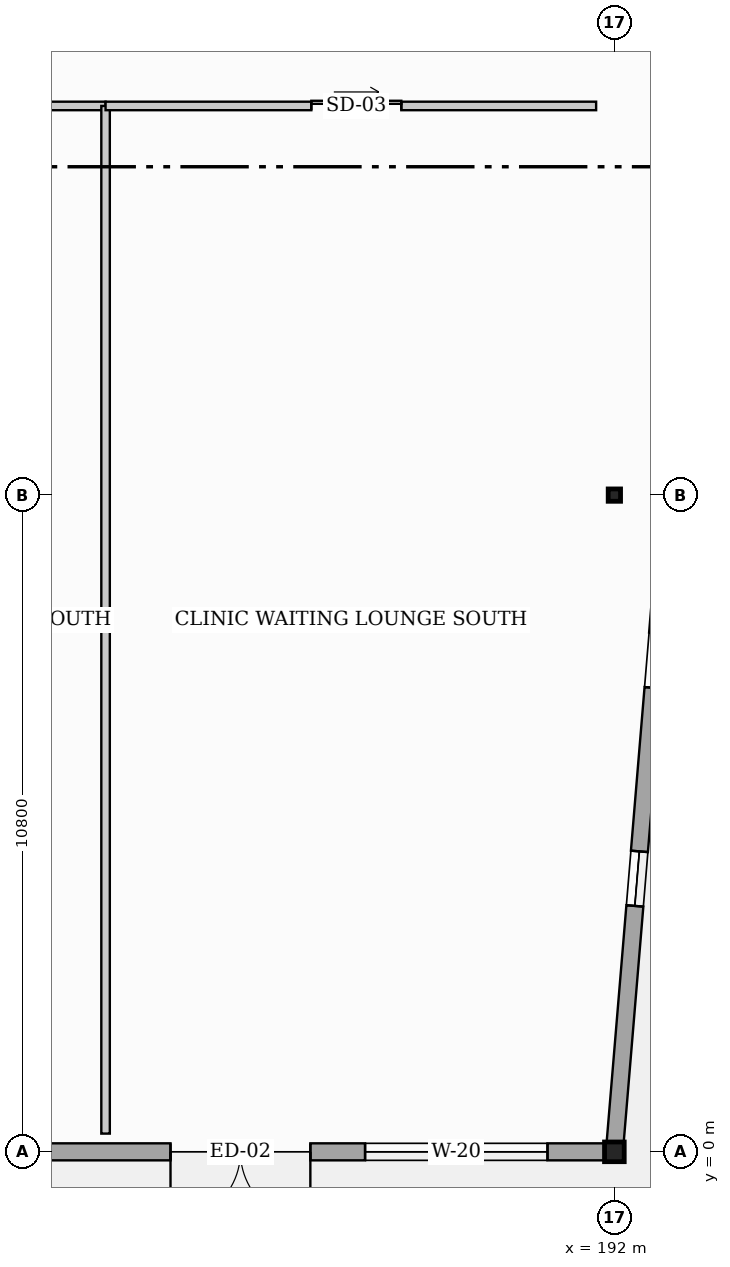
"""IFC4 building model, lengths in metres.
Left out: names, types, materials, properties, quantities, classifications, styles, units other than length and angle.
Written with IfcOpenShell. Run it as: python <this file> out.ifc"""

import sys

from ifc_helpers import new_model, si_unit, direction, frame, frame_2d, origin, origin_2d, place, context, subcontext, project, spatial, rectangle, hollow_circle, i_section, extrude, element, fill, save


model = new_model("IFC4")
c1 = context("Model", 3, precision=1e-05, world=origin(), true_north=direction((0.0, 1.0)))
c2 = subcontext(c1, "Body", "Model", "MODEL_VIEW")
j1 = project(units=[si_unit("LENGTHUNIT", "METRE"), si_unit("PLANEANGLEUNIT", "RADIAN")], contexts=[c1])
p1 = place(None, origin())
s1 = spatial("IfcSite", under=j1, at=p1, CompositionType="ELEMENT")
p2 = place(p1, origin())
s2 = spatial("IfcBuilding", under=s1, at=p2, CompositionType="ELEMENT")
p3 = place(p2, origin())
s3 = spatial("IfcBuildingStorey", under=s2, at=p3, CompositionType="ELEMENT", Elevation=0.0)
p4 = place(p3, frame((192.0, 0.0, 0.0), z_axis=(0.0, 0.0, 1.0), x_axis=(1.0, 0.0, 0.0)))
e1 = element("IfcColumn", 1, at=p4, inside=s3, PredefinedType="COLUMN", context=c2, shape_type="SweptSolid", body=[
    extrude(hollow_circle(Radius=0.162, WallThickness=0.013, at=origin_2d()), origin(), (0.0, 0.0, 1.0), 4.8),
])
p5 = place(p3, frame((192.0, 10.8, 0.0), z_axis=(0.0, 0.0, 1.0), x_axis=(1.0, 0.0, 0.0)))
e2 = element("IfcColumn", 2, at=p5, inside=s3, PredefinedType="COLUMN", context=c2, shape_type="SweptSolid", body=[
    extrude(i_section(OverallWidth=0.203, OverallDepth=0.203, WebThickness=0.007, FlangeThickness=0.011, at=origin_2d()), origin(), (0.0, 0.0, 1.0), 4.8),
])
p6 = place(p3, frame((192.0, 0.0, 0.0), z_axis=(0.0, 0.0, 1.0), x_axis=(-1.0, 0.0, 0.0)))
e3 = element("IfcWall", 3, at=p6, inside=s3, PredefinedType="STANDARD", context=c2, shape_type="SweptSolid", body=[
    extrude(rectangle(XDim=24.0, YDim=0.28, at=frame_2d((12.0, 0.0))), origin(), (0.0, 0.0, 1.0), 3.823),
])
p7 = place(p6, frame((5.0, 0.0, 0.0)))
e4 = element("IfcOpeningElement", 4, at=p7, cuts=e3, PredefinedType="OPENING", context=c2, shape_type="SweptSolid", body=[
    extrude(rectangle(XDim=2.3, YDim=2.3, at=frame_2d((1.15, 1.15))), frame((0.0, 0.15, 0.0), z_axis=(0.0, -1.0, 0.0), x_axis=(1.0, 0.0, 0.0)), (0.0, 0.0, 1.0), 0.3),
])
p8 = place(p6, frame((16.5, 0.0, 0.0)))
e5 = element("IfcOpeningElement", 5, at=p8, cuts=e3, PredefinedType="OPENING", context=c2, shape_type="SweptSolid", body=[
    extrude(rectangle(XDim=2.3, YDim=2.3, at=frame_2d((1.15, 1.15))), frame((0.0, 0.15, 0.0), z_axis=(0.0, -1.0, 0.0), x_axis=(1.0, 0.0, 0.0)), (0.0, 0.0, 1.0), 0.3),
])
p9 = place(p6, frame((1.1, 0.0, 0.95)))
e6 = element("IfcOpeningElement", 6, at=p9, cuts=e3, PredefinedType="OPENING", context=c2, shape_type="SweptSolid", body=[
    extrude(rectangle(XDim=3.0, YDim=0.9, at=frame_2d((1.5, 0.45))), frame((0.0, 0.15, 0.0), z_axis=(0.0, -1.0, 0.0), x_axis=(1.0, 0.0, 0.0)), (0.0, 0.0, 1.0), 0.3),
])
p10 = place(p3, frame((192.0, 45.6, 0.0), z_axis=(0.0, 0.0, 1.0), x_axis=(0.048550316721, -0.998820738044, 0.0)))
e7 = element("IfcWall", 7, at=p10, inside=s3, PredefinedType="STANDARD", context=c2, shape_type="SweptSolid", body=[
    extrude(rectangle(XDim=28.834, YDim=0.28, at=frame_2d((14.417, 0.0))), origin(), (0.0, 0.0, 1.0), 3.897),
])
p11 = place(p10, frame((0.673, 0.0, 0.0)))
e8 = element("IfcOpeningElement", 8, at=p11, cuts=e7, PredefinedType="OPENING", context=c2, shape_type="SweptSolid", body=[
    extrude(rectangle(XDim=2.46, YDim=2.4, at=frame_2d((1.23, 1.2))), frame((0.0, 0.15, 0.0), z_axis=(0.0, -1.0, 0.0), x_axis=(1.0, 0.0, 0.0)), (0.0, 0.0, 1.0), 0.3),
])
p12 = place(p10, frame((4.7, 0.0, 0.95)))
e9 = element("IfcOpeningElement", 9, at=p12, cuts=e7, PredefinedType="OPENING", context=c2, shape_type="SweptSolid", body=[
    extrude(rectangle(XDim=0.9, YDim=1.8, at=frame_2d((0.45, 0.9))), frame((0.0, 0.15, 0.0), z_axis=(0.0, -1.0, 0.0), x_axis=(1.0, 0.0, 0.0)), (0.0, 0.0, 1.0), 0.3),
])
p13 = place(p10, frame((8.3, 0.0, 0.95)))
e10 = element("IfcOpeningElement", 10, at=p13, cuts=e7, PredefinedType="OPENING", context=c2, shape_type="SweptSolid", body=[
    extrude(rectangle(XDim=0.9, YDim=1.8, at=frame_2d((0.45, 0.9))), frame((0.0, 0.15, 0.0), z_axis=(0.0, -1.0, 0.0), x_axis=(1.0, 0.0, 0.0)), (0.0, 0.0, 1.0), 0.3),
])
p14 = place(p10, frame((15.5, 0.0, 0.95)))
e11 = element("IfcOpeningElement", 11, at=p14, cuts=e7, PredefinedType="OPENING", context=c2, shape_type="SweptSolid", body=[
    extrude(rectangle(XDim=0.9, YDim=1.8, at=frame_2d((0.45, 0.9))), frame((0.0, 0.15, 0.0), z_axis=(0.0, -1.0, 0.0), x_axis=(1.0, 0.0, 0.0)), (0.0, 0.0, 1.0), 0.3),
])
p15 = place(p10, frame((19.1, 0.0, 0.95)))
e12 = element("IfcOpeningElement", 12, at=p15, cuts=e7, PredefinedType="OPENING", context=c2, shape_type="SweptSolid", body=[
    extrude(rectangle(XDim=0.9, YDim=1.8, at=frame_2d((0.45, 0.9))), frame((0.0, 0.15, 0.0), z_axis=(0.0, -1.0, 0.0), x_axis=(1.0, 0.0, 0.0)), (0.0, 0.0, 1.0), 0.3),
])
p16 = place(p10, frame((22.7, 0.0, 0.95)))
e13 = element("IfcOpeningElement", 13, at=p16, cuts=e7, PredefinedType="OPENING", context=c2, shape_type="SweptSolid", body=[
    extrude(rectangle(XDim=0.9, YDim=1.8, at=frame_2d((0.45, 0.9))), frame((0.0, 0.15, 0.0), z_axis=(0.0, -1.0, 0.0), x_axis=(1.0, 0.0, 0.0)), (0.0, 0.0, 1.0), 0.3),
])
p17 = place(p10, frame((26.3, 0.0, 0.95)))
e14 = element("IfcOpeningElement", 14, at=p17, cuts=e7, PredefinedType="OPENING", context=c2, shape_type="SweptSolid", body=[
    extrude(rectangle(XDim=0.9, YDim=1.8, at=frame_2d((0.45, 0.9))), frame((0.0, 0.15, 0.0), z_axis=(0.0, -1.0, 0.0), x_axis=(1.0, 0.0, 0.0)), (0.0, 0.0, 1.0), 0.3),
])
p18 = place(p3, frame((193.4, 16.8, 0.0), z_axis=(0.0, 0.0, 1.0), x_axis=(-0.083039487322, -0.996546257604, 0.0)))
e15 = element("IfcWall", 15, at=p18, inside=s3, PredefinedType="STANDARD", context=c2, shape_type="SweptSolid", body=[
    extrude(rectangle(XDim=16.858, YDim=0.28, at=frame_2d((8.429, 0.0))), origin(), (0.0, 0.0, 1.0), 3.976),
])
p19 = place(p18, frame((0.673, 0.0, 0.0)))
e16 = element("IfcOpeningElement", 16, at=p19, cuts=e15, PredefinedType="OPENING", context=c2, shape_type="SweptSolid", body=[
    extrude(rectangle(XDim=2.46, YDim=2.4, at=frame_2d((1.23, 1.2))), frame((0.0, 0.15, 0.0), z_axis=(0.0, -1.0, 0.0), x_axis=(1.0, 0.0, 0.0)), (0.0, 0.0, 1.0), 0.3),
])
p20 = place(p18, frame((4.7, 0.0, 0.95)))
e17 = element("IfcOpeningElement", 17, at=p20, cuts=e15, PredefinedType="OPENING", context=c2, shape_type="SweptSolid", body=[
    extrude(rectangle(XDim=0.9, YDim=1.8, at=frame_2d((0.45, 0.9))), frame((0.0, 0.15, 0.0), z_axis=(0.0, -1.0, 0.0), x_axis=(1.0, 0.0, 0.0)), (0.0, 0.0, 1.0), 0.3),
])
p21 = place(p18, frame((8.3, 0.0, 0.95)))
e18 = element("IfcOpeningElement", 18, at=p21, cuts=e15, PredefinedType="OPENING", context=c2, shape_type="SweptSolid", body=[
    extrude(rectangle(XDim=0.9, YDim=1.8, at=frame_2d((0.45, 0.9))), frame((0.0, 0.15, 0.0), z_axis=(0.0, -1.0, 0.0), x_axis=(1.0, 0.0, 0.0)), (0.0, 0.0, 1.0), 0.3),
])
p22 = place(p18, frame((11.9, 0.0, 0.95)))
e19 = element("IfcOpeningElement", 19, at=p22, cuts=e15, PredefinedType="OPENING", context=c2, shape_type="SweptSolid", body=[
    extrude(rectangle(XDim=0.9, YDim=1.8, at=frame_2d((0.45, 0.9))), frame((0.0, 0.15, 0.0), z_axis=(0.0, -1.0, 0.0), x_axis=(1.0, 0.0, 0.0)), (0.0, 0.0, 1.0), 0.3),
])
p23 = place(p3, frame((177.581, 17.2, 0.0), z_axis=(0.0, 0.0, 1.0), x_axis=(1.0, 0.0, 0.0)))
e20 = element("IfcWall", 20, at=p23, inside=s3, PredefinedType="PARTITIONING", context=c2, shape_type="SweptSolid", body=[
    extrude(rectangle(XDim=6.051, YDim=0.14, at=frame_2d((3.025, 0.0))), origin(), (0.0, 0.0, 1.0), 3.897),
])
p24 = place(p23, frame((2.376, 0.0, 0.0)))
e21 = element("IfcOpeningElement", 21, at=p24, cuts=e20, PredefinedType="OPENING", context=c2, shape_type="SweptSolid", body=[
    extrude(rectangle(XDim=1.62, YDim=2.3, at=frame_2d((0.81, 1.15))), frame((0.0, 0.08, 0.0), z_axis=(0.0, -1.0, 0.0), x_axis=(1.0, 0.0, 0.0)), (0.0, 0.0, 1.0), 0.16),
])
p25 = place(p3, frame((183.632, 0.3, 0.0), z_axis=(0.0, 0.0, 1.0), x_axis=(0.0, 1.0, 0.0)))
e22 = element("IfcWall", 22, at=p25, inside=s3, PredefinedType="PARTITIONING", context=c2, shape_type="SweptSolid", body=[
    extrude(rectangle(XDim=16.9, YDim=0.14, at=frame_2d((8.45, 0.0))), origin(), (0.0, 0.0, 1.0), 3.818),
])
p26 = place(p3, frame((183.632, 17.2, 0.0), z_axis=(0.0, 0.0, 1.0), x_axis=(1.0, 0.0, 0.0)))
e23 = element("IfcWall", 23, at=p26, inside=s3, PredefinedType="PARTITIONING", context=c2, shape_type="SweptSolid", body=[
    extrude(rectangle(XDim=8.068, YDim=0.14, at=frame_2d((4.034, 0.0))), origin(), (0.0, 0.0, 1.0), 4.027),
])
p27 = place(p26, frame((3.384, 0.0, 0.0)))
e24 = element("IfcOpeningElement", 24, at=p27, cuts=e23, PredefinedType="OPENING", context=c2, shape_type="SweptSolid", body=[
    extrude(rectangle(XDim=1.48, YDim=2.26, at=frame_2d((0.74, 1.13))), frame((0.0, 0.08, 0.0), z_axis=(0.0, -1.0, 0.0), x_axis=(1.0, 0.0, 0.0)), (0.0, 0.0, 1.0), 0.16),
])
p28 = place(p7, origin())
e25 = element("IfcDoor", 25, at=p28, inside=s3, OperationType="DOUBLE_DOOR_SINGLE_SWING", PredefinedType="DOOR", context=c2, shape_type="SweptSolid", body=[
    extrude(rectangle(XDim=2.3, YDim=2.3, at=frame_2d((1.15, 1.15))), frame((0.0, 0.025, 0.0), z_axis=(0.0, -1.0, 0.0), x_axis=(1.0, 0.0, 0.0)), (0.0, 0.0, 1.0), 0.05),
])
fill(e4, e25)
p29 = place(p9, origin())
e26 = element("IfcWindow", 26, at=p29, inside=s3, PartitioningType="TRIPLE_PANEL_VERTICAL", PredefinedType="WINDOW", context=c2, shape_type="SweptSolid", body=[
    extrude(rectangle(XDim=3.0, YDim=0.9, at=frame_2d((1.5, 0.45))), frame((0.0, 0.03, 0.0), z_axis=(0.0, -1.0, 0.0), x_axis=(1.0, 0.0, 0.0)), (0.0, 0.0, 1.0), 0.06),
])
fill(e6, e26)
p30 = place(p22, origin())
e27 = element("IfcWindow", 27, at=p30, inside=s3, PartitioningType="SINGLE_PANEL", PredefinedType="WINDOW", context=c2, shape_type="SweptSolid", body=[
    extrude(rectangle(XDim=0.9, YDim=1.8, at=frame_2d((0.45, 0.9))), frame((0.0, 0.03, 0.0), z_axis=(0.0, -1.0, 0.0), x_axis=(1.0, 0.0, 0.0)), (0.0, 0.0, 1.0), 0.06),
])
fill(e19, e27)
p31 = place(p27, origin())
e28 = element("IfcDoor", 28, at=p31, inside=s3, OperationType="SLIDING_TO_LEFT", PredefinedType="DOOR", context=c2, shape_type="SweptSolid", body=[
    extrude(rectangle(XDim=1.48, YDim=2.26, at=frame_2d((0.74, 1.13))), frame((0.0, 0.025, 0.0), z_axis=(0.0, -1.0, 0.0), x_axis=(1.0, 0.0, 0.0)), (0.0, 0.0, 1.0), 0.05),
])
fill(e24, e28)
save(model, sys.argv[1])
